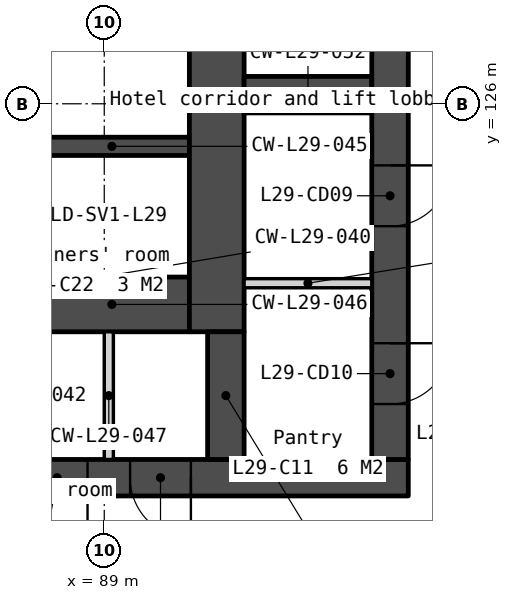
"""IFC4 building model, lengths in metres.
Left out: names, types, materials, properties, quantities, classifications, styles, units other than length and angle.
Written with IfcOpenShell. Run it as: python <this file> out.ifc"""

import sys

from ifc_helpers import new_model, si_unit, direction, frame, frame_2d, origin, place, context, subcontext, project, spatial, polyline, rectangle, outline, extrude, element, fill, save


model = new_model("IFC4")
c1 = context("Model", 3, precision=1e-05, world=origin(), true_north=direction((0.0, 1.0)))
c2 = subcontext(c1, "Body", "Model", "MODEL_VIEW")
j1 = project(units=[si_unit("LENGTHUNIT", "METRE"), si_unit("PLANEANGLEUNIT", "RADIAN")], contexts=[c1])
p1 = place(None, origin())
s1 = spatial("IfcSite", under=j1, at=p1, CompositionType="ELEMENT")
p2 = place(p1, origin())
s2 = spatial("IfcBuilding", under=s1, at=p2, CompositionType="ELEMENT")
p3 = place(p2, frame((0.0, 0.0, 116.8)))
s3 = spatial("IfcBuildingStorey", under=s2, at=p3, CompositionType="ELEMENT", Elevation=116.8)
p4 = place(p3, frame((66.0, 119.85, 0.0), z_axis=(0.0, 0.0, 1.0), x_axis=(1.0, 0.0, 0.0)))
e1 = element("IfcWall", 1, at=p4, inside=s3, PredefinedType="SOLIDWALL", context=c2, shape_type="SweptSolid", body=[
    extrude(rectangle(XDim=28.0, YDim=0.6, at=frame_2d((14.0, 0.0))), origin(), (0.0, 0.0, 1.0), 3.35),
])
p5 = place(p4, frame((6.825, 0.0, 0.0)))
e2 = element("IfcOpeningElement", 2, at=p5, cuts=e1, PredefinedType="OPENING", context=c2, shape_type="SweptSolid", body=[
    extrude(rectangle(XDim=1.8, YDim=2.1, at=frame_2d((0.9, 1.05))), frame((0.0, 0.31, 0.0), z_axis=(0.0, -1.0, 0.0), x_axis=(1.0, 0.0, 0.0)), (0.0, 0.0, 1.0), 0.62),
])
p6 = place(p4, frame((15.85, 0.0, 0.0)))
e3 = element("IfcOpeningElement", 3, at=p6, cuts=e1, PredefinedType="OPENING", context=c2, shape_type="SweptSolid", body=[
    extrude(rectangle(XDim=1.5, YDim=2.1, at=frame_2d((0.75, 1.05))), frame((0.0, 0.31, 0.0), z_axis=(0.0, -1.0, 0.0), x_axis=(1.0, 0.0, 0.0)), (0.0, 0.0, 1.0), 0.62),
])
p7 = place(p4, frame((19.375, 0.0, 0.0)))
e4 = element("IfcOpeningElement", 4, at=p7, cuts=e1, PredefinedType="OPENING", context=c2, shape_type="SweptSolid", body=[
    extrude(rectangle(XDim=1.8, YDim=2.1, at=frame_2d((0.9, 1.05))), frame((0.0, 0.31, 0.0), z_axis=(0.0, -1.0, 0.0), x_axis=(1.0, 0.0, 0.0)), (0.0, 0.0, 1.0), 0.62),
])
p8 = place(p4, frame((4.425, 0.0, 0.0)))
e5 = element("IfcOpeningElement", 5, at=p8, cuts=e1, PredefinedType="OPENING", context=c2, shape_type="SweptSolid", body=[
    extrude(rectangle(XDim=1.0, YDim=2.1, at=frame_2d((0.5, 1.05))), frame((0.0, 0.31, 0.0), z_axis=(0.0, -1.0, 0.0), x_axis=(1.0, 0.0, 0.0)), (0.0, 0.0, 1.0), 0.62),
])
p9 = place(p4, frame((9.783, 0.0, 0.0)))
e6 = element("IfcOpeningElement", 6, at=p9, cuts=e1, PredefinedType="OPENING", context=c2, shape_type="SweptSolid", body=[
    extrude(rectangle(XDim=1.0, YDim=2.1, at=frame_2d((0.5, 1.05))), frame((0.0, 0.31, 0.0), z_axis=(0.0, -1.0, 0.0), x_axis=(1.0, 0.0, 0.0)), (0.0, 0.0, 1.0), 0.62),
])
p10 = place(p4, frame((11.525, 0.0, 0.0)))
e7 = element("IfcOpeningElement", 7, at=p10, cuts=e1, PredefinedType="OPENING", context=c2, shape_type="SweptSolid", body=[
    extrude(rectangle(XDim=1.0, YDim=2.1, at=frame_2d((0.5, 1.05))), frame((0.0, 0.31, 0.0), z_axis=(0.0, -1.0, 0.0), x_axis=(1.0, 0.0, 0.0)), (0.0, 0.0, 1.0), 0.62),
])
p11 = place(p4, frame((13.658, 0.0, 0.0)))
e8 = element("IfcOpeningElement", 8, at=p11, cuts=e1, PredefinedType="OPENING", context=c2, shape_type="SweptSolid", body=[
    extrude(rectangle(XDim=1.0, YDim=2.1, at=frame_2d((0.5, 1.05))), frame((0.0, 0.31, 0.0), z_axis=(0.0, -1.0, 0.0), x_axis=(1.0, 0.0, 0.0)), (0.0, 0.0, 1.0), 0.62),
])
p12 = place(p4, frame((21.725, 0.0, 0.0)))
e9 = element("IfcOpeningElement", 9, at=p12, cuts=e1, PredefinedType="OPENING", context=c2, shape_type="SweptSolid", body=[
    extrude(rectangle(XDim=1.0, YDim=2.1, at=frame_2d((0.5, 1.05))), frame((0.0, 0.31, 0.0), z_axis=(0.0, -1.0, 0.0), x_axis=(1.0, 0.0, 0.0)), (0.0, 0.0, 1.0), 0.62),
])
p13 = place(p4, frame((23.425, 0.0, 0.0)))
e10 = element("IfcOpeningElement", 10, at=p13, cuts=e1, PredefinedType="OPENING", context=c2, shape_type="SweptSolid", body=[
    extrude(rectangle(XDim=1.0, YDim=2.1, at=frame_2d((0.5, 1.05))), frame((0.0, 0.31, 0.0), z_axis=(0.0, -1.0, 0.0), x_axis=(1.0, 0.0, 0.0)), (0.0, 0.0, 1.0), 0.62),
])
p14 = place(p3, frame((87.85, 125.3, 0.0), z_axis=(0.0, 0.0, 1.0), x_axis=(1.0, 0.0, 0.0)))
e11 = element("IfcWall", 11, at=p14, inside=s3, PredefinedType="SOLIDWALL", context=c2, shape_type="SweptSolid", body=[
    extrude(rectangle(XDim=2.55, YDim=0.3, at=frame_2d((1.275, 0.0))), origin(), (0.0, 0.0, 1.0), 3.35),
])
p15 = place(p3, frame((87.85, 122.7, 0.0), z_axis=(0.0, 0.0, 1.0), x_axis=(1.0, 0.0, 0.0)))
e12 = element("IfcWall", 12, at=p15, inside=s3, PredefinedType="SOLIDWALL", context=c2, shape_type="SweptSolid", body=[
    extrude(rectangle(XDim=2.55, YDim=0.9, at=frame_2d((1.275, 0.0))), origin(), (0.0, 0.0, 1.0), 3.35),
])
p16 = place(p3, frame((89.075, 122.25, 0.0), z_axis=(0.0, 0.0, 1.0), x_axis=(0.0, -1.0, 0.0)))
e13 = element("IfcWall", 13, at=p16, inside=s3, PredefinedType="PARTITIONING", context=c2, shape_type="SweptSolid", body=[
    extrude(rectangle(XDim=2.1, YDim=0.15, at=frame_2d((1.05, 0.0))), origin(), (0.0, 0.0, 1.0), 3.35),
])
p17 = place(p3, frame((90.85, 133.95, 0.0), z_axis=(0.0, 0.0, 1.0), x_axis=(0.0, -1.0, 0.0)))
e14 = element("IfcWall", 14, at=p17, inside=s3, PredefinedType="SOLIDWALL", context=c2, shape_type="SweptSolid", body=[
    extrude(rectangle(XDim=11.7, YDim=0.9, at=frame_2d((5.85, 0.0))), origin(), (0.0, 0.0, 1.0), 3.35),
])
p18 = place(p3, frame((91.0, 122.25, 0.0), z_axis=(0.0, 0.0, 1.0), x_axis=(0.0, -1.0, 0.0)))
e15 = element("IfcWall", 15, at=p18, inside=s3, PredefinedType="SOLIDWALL", context=c2, shape_type="SweptSolid", body=[
    extrude(rectangle(XDim=2.1, YDim=0.6, at=frame_2d((1.05, 0.0))), origin(), (0.0, 0.0, 1.0), 3.35),
])
p19 = place(p3, frame((91.3, 126.15, 0.0), z_axis=(0.0, 0.0, 1.0), x_axis=(1.0, 0.0, 0.0)))
e16 = element("IfcWall", 16, at=p19, inside=s3, PredefinedType="SOLIDWALL", context=c2, shape_type="SweptSolid", body=[
    extrude(rectangle(XDim=2.1, YDim=0.6, at=frame_2d((1.05, 0.0))), origin(), (0.0, 0.0, 1.0), 3.35),
])
p20 = place(p3, frame((91.3, 123.049, 0.0), z_axis=(0.0, 0.0, 1.0), x_axis=(1.0, 0.0, 0.0)))
e17 = element("IfcWall", 17, at=p20, inside=s3, PredefinedType="PARTITIONING", context=c2, shape_type="SweptSolid", body=[
    extrude(rectangle(XDim=2.1, YDim=0.15, at=frame_2d((1.05, 0.0))), origin(), (0.0, 0.0, 1.0), 3.35),
])
p21 = place(p3, frame((93.7, 133.95, 0.0), z_axis=(0.0, 0.0, 1.0), x_axis=(0.0, -1.0, 0.0)))
e18 = element("IfcWall", 18, at=p21, inside=s3, PredefinedType="SOLIDWALL", context=c2, shape_type="SweptSolid", body=[
    extrude(rectangle(XDim=13.8, YDim=0.6, at=frame_2d((6.9, 0.0))), origin(), (0.0, 0.0, 1.0), 3.35),
])
p22 = place(p21, frame((0.6, 0.0, 0.0)))
e19 = element("IfcOpeningElement", 19, at=p22, cuts=e18, PredefinedType="OPENING", context=c2, shape_type="SweptSolid", body=[
    extrude(rectangle(XDim=1.1, YDim=2.1, at=frame_2d((0.55, 1.05))), frame((0.0, 0.31, 0.0), z_axis=(0.0, -1.0, 0.0), x_axis=(1.0, 0.0, 0.0)), (0.0, 0.0, 1.0), 0.62),
])
p23 = place(p21, frame((8.963, 0.0, 0.0)))
e20 = element("IfcOpeningElement", 20, at=p23, cuts=e18, PredefinedType="OPENING", context=c2, shape_type="SweptSolid", body=[
    extrude(rectangle(XDim=1.0, YDim=2.1, at=frame_2d((0.5, 1.05))), frame((0.0, 0.31, 0.0), z_axis=(0.0, -1.0, 0.0), x_axis=(1.0, 0.0, 0.0)), (0.0, 0.0, 1.0), 0.62),
])
p24 = place(p21, frame((11.888, 0.0, 0.0)))
e21 = element("IfcOpeningElement", 21, at=p24, cuts=e18, PredefinedType="OPENING", context=c2, shape_type="SweptSolid", body=[
    extrude(rectangle(XDim=1.0, YDim=2.1, at=frame_2d((0.5, 1.05))), frame((0.0, 0.31, 0.0), z_axis=(0.0, -1.0, 0.0), x_axis=(1.0, 0.0, 0.0)), (0.0, 0.0, 1.0), 0.62),
])
p25 = place(p3, frame((91.934, 109.49, -0.15), z_axis=(0.0, 0.0, 1.0), x_axis=(0.500002343971, 0.866024050488, 0.0)))
e22 = element("IfcWall", 22, at=p25, inside=s3, PredefinedType="SOLIDWALL", context=c2, shape_type="SweptSolid", body=[
    extrude(outline(polyline([(23.986, 3.5), (23.986, 0.0), (0.0, 0.0), (0.0, 3.5), (23.986, 3.5)])), frame((0.0, 0.225, 0.0), z_axis=(0.0, -1.0, 0.0), x_axis=(1.0, 0.0, 0.0)), (0.0, 0.0, 1.0), 0.45),
])
p26 = place(p25, frame((5.479, 0.0, 1.05)))
e23 = element("IfcOpeningElement", 23, at=p26, cuts=e22, PredefinedType="OPENING", context=c2, shape_type="SweptSolid", body=[
    extrude(rectangle(XDim=1.2, YDim=1.5, at=frame_2d((0.6, 0.75))), frame((0.0, 0.235, 0.0), z_axis=(0.0, -1.0, 0.0), x_axis=(1.0, 0.0, 0.0)), (0.0, 0.0, 1.0), 0.47),
])
p27 = place(p25, frame((7.179, 0.0, 1.05)))
e24 = element("IfcOpeningElement", 24, at=p27, cuts=e22, PredefinedType="OPENING", context=c2, shape_type="SweptSolid", body=[
    extrude(rectangle(XDim=1.2, YDim=1.5, at=frame_2d((0.6, 0.75))), frame((0.0, 0.235, 0.0), z_axis=(0.0, -1.0, 0.0), x_axis=(1.0, 0.0, 0.0)), (0.0, 0.0, 1.0), 0.47),
])
p28 = place(p25, frame((14.007, 0.0, 1.05)))
e25 = element("IfcOpeningElement", 25, at=p28, cuts=e22, PredefinedType="OPENING", context=c2, shape_type="SweptSolid", body=[
    extrude(rectangle(XDim=1.2, YDim=1.5, at=frame_2d((0.6, 0.75))), frame((0.0, 0.235, 0.0), z_axis=(0.0, -1.0, 0.0), x_axis=(1.0, 0.0, 0.0)), (0.0, 0.0, 1.0), 0.47),
])
p29 = place(p25, frame((15.707, 0.0, 1.05)))
e26 = element("IfcOpeningElement", 26, at=p29, cuts=e22, PredefinedType="OPENING", context=c2, shape_type="SweptSolid", body=[
    extrude(rectangle(XDim=1.2, YDim=1.5, at=frame_2d((0.6, 0.75))), frame((0.0, 0.235, 0.0), z_axis=(0.0, -1.0, 0.0), x_axis=(1.0, 0.0, 0.0)), (0.0, 0.0, 1.0), 0.47),
])
p30 = place(p25, frame((22.065, 0.0, 1.05)))
e27 = element("IfcOpeningElement", 27, at=p30, cuts=e22, PredefinedType="OPENING", context=c2, shape_type="SweptSolid", body=[
    extrude(rectangle(XDim=1.2, YDim=1.5, at=frame_2d((0.6, 0.75))), frame((0.0, 0.235, 0.0), z_axis=(0.0, -1.0, 0.0), x_axis=(1.0, 0.0, 0.0)), (0.0, 0.0, 1.0), 0.47),
])
p31 = place(p23, origin())
e28 = element("IfcDoor", 28, at=p31, inside=s3, OperationType="SINGLE_SWING_LEFT", PredefinedType="DOOR", context=c2, shape_type="SweptSolid", body=[
    extrude(rectangle(XDim=1.0, YDim=2.1, at=frame_2d((0.5, 1.05))), frame((0.0, 0.025, 0.0), z_axis=(0.0, -1.0, 0.0), x_axis=(1.0, 0.0, 0.0)), (0.0, 0.0, 1.0), 0.05),
])
fill(e20, e28)
p32 = place(p24, origin())
e29 = element("IfcDoor", 29, at=p32, inside=s3, OperationType="SINGLE_SWING_LEFT", PredefinedType="DOOR", context=c2, shape_type="SweptSolid", body=[
    extrude(rectangle(XDim=1.0, YDim=2.1, at=frame_2d((0.5, 1.05))), frame((0.0, 0.025, 0.0), z_axis=(0.0, -1.0, 0.0), x_axis=(1.0, 0.0, 0.0)), (0.0, 0.0, 1.0), 0.05),
])
fill(e21, e29)
p33 = place(p12, origin())
e30 = element("IfcDoor", 30, at=p33, inside=s3, OperationType="SINGLE_SWING_RIGHT", PredefinedType="DOOR", context=c2, shape_type="SweptSolid", body=[
    extrude(rectangle(XDim=1.0, YDim=2.1, at=frame_2d((0.5, 1.05))), frame((0.0, 0.025, 0.0), z_axis=(0.0, -1.0, 0.0), x_axis=(1.0, 0.0, 0.0)), (0.0, 0.0, 1.0), 0.05),
])
fill(e9, e30)
p34 = place(p13, origin())
e31 = element("IfcDoor", 31, at=p34, inside=s3, OperationType="SINGLE_SWING_RIGHT", PredefinedType="DOOR", context=c2, shape_type="SweptSolid", body=[
    extrude(rectangle(XDim=1.0, YDim=2.1, at=frame_2d((0.5, 1.05))), frame((0.0, 0.025, 0.0), z_axis=(0.0, -1.0, 0.0), x_axis=(1.0, 0.0, 0.0)), (0.0, 0.0, 1.0), 0.05),
])
fill(e10, e31)
save(model, sys.argv[1])
